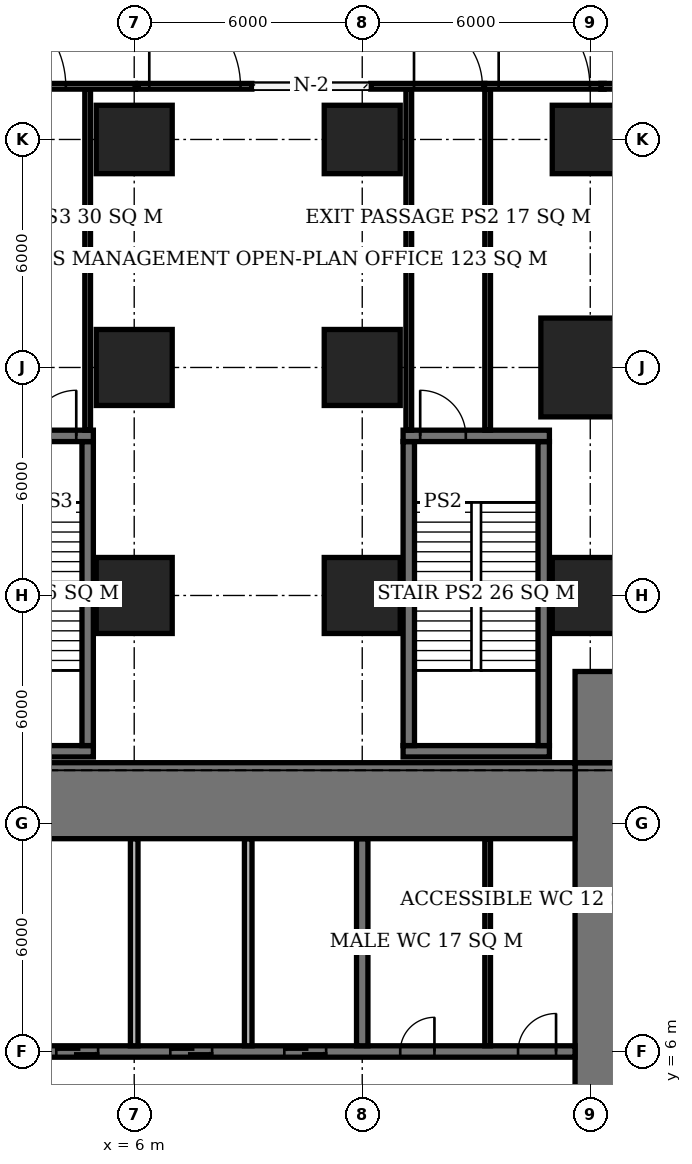
"""IFC4 building model, lengths in metres.
Left out: names, types, materials, properties, quantities, classifications, styles, units other than length and angle.
Written with IfcOpenShell. Run it as: python <this file> out.ifc"""

import sys

from ifc_helpers import new_model, si_unit, direction, frame, frame_2d, origin, origin_2d, place, context, subcontext, project, spatial, rectangle, extrude, element, fill, save


model = new_model("IFC4")
c1 = context("Model", 3, precision=1e-05, world=origin(), true_north=direction((0.0, 1.0)))
c2 = subcontext(c1, "Body", "Model", "MODEL_VIEW")
j1 = project(units=[si_unit("LENGTHUNIT", "METRE"), si_unit("PLANEANGLEUNIT", "RADIAN")], contexts=[c1])
p1 = place(None, origin())
s1 = spatial("IfcSite", under=j1, at=p1, CompositionType="ELEMENT")
p2 = place(p1, origin())
s2 = spatial("IfcBuilding", under=s1, at=p2, CompositionType="ELEMENT")
p3 = place(p2, origin())
s3 = spatial("IfcBuildingStorey", under=s2, at=p3, CompositionType="ELEMENT", Elevation=0.0)
p4 = place(p3, frame((6.0, 18.0, 0.0), z_axis=(0.0, 0.0, 1.0), x_axis=(1.0, 0.0, 0.0)))
e1 = element("IfcColumn", 1, at=p4, inside=s3, PredefinedType="COLUMN", context=c2, shape_type="SweptSolid", body=[
    extrude(rectangle(XDim=2.0, YDim=2.0, at=origin_2d()), origin(), (0.0, 0.0, 1.0), 6.0),
])
p5 = place(p3, frame((6.0, 24.0, -0.45), z_axis=(0.0, 0.0, 1.0), x_axis=(1.0, 0.0, 0.0)))
e2 = element("IfcColumn", 2, at=p5, inside=s3, PredefinedType="COLUMN", context=c2, shape_type="SweptSolid", body=[
    extrude(rectangle(XDim=2.0, YDim=2.0, at=origin_2d()), origin(), (0.0, 0.0, 1.0), 6.45),
])
p6 = place(p3, frame((6.0, 30.0, -0.45), z_axis=(0.0, 0.0, 1.0), x_axis=(1.0, 0.0, 0.0)))
e3 = element("IfcColumn", 3, at=p6, inside=s3, PredefinedType="COLUMN", context=c2, shape_type="SweptSolid", body=[
    extrude(rectangle(XDim=2.0, YDim=1.8, at=origin_2d()), origin(), (0.0, 0.0, 1.0), 6.45),
])
p7 = place(p3, frame((12.0, 18.0, 0.0), z_axis=(0.0, 0.0, 1.0), x_axis=(1.0, 0.0, 0.0)))
e4 = element("IfcColumn", 4, at=p7, inside=s3, PredefinedType="COLUMN", context=c2, shape_type="SweptSolid", body=[
    extrude(rectangle(XDim=2.0, YDim=2.0, at=origin_2d()), origin(), (0.0, 0.0, 1.0), 6.0),
])
p8 = place(p3, frame((12.0, 24.0, -0.45), z_axis=(0.0, 0.0, 1.0), x_axis=(1.0, 0.0, 0.0)))
e5 = element("IfcColumn", 5, at=p8, inside=s3, PredefinedType="COLUMN", context=c2, shape_type="SweptSolid", body=[
    extrude(rectangle(XDim=2.0, YDim=2.0, at=origin_2d()), origin(), (0.0, 0.0, 1.0), 6.45),
])
p9 = place(p3, frame((12.0, 30.0, -0.45), z_axis=(0.0, 0.0, 1.0), x_axis=(1.0, 0.0, 0.0)))
e6 = element("IfcColumn", 6, at=p9, inside=s3, PredefinedType="COLUMN", context=c2, shape_type="SweptSolid", body=[
    extrude(rectangle(XDim=2.0, YDim=1.8, at=origin_2d()), origin(), (0.0, 0.0, 1.0), 6.45),
])
p10 = place(p3, frame((18.0, 18.0, 0.0), z_axis=(0.0, 0.0, 1.0), x_axis=(1.0, 0.0, 0.0)))
e7 = element("IfcColumn", 7, at=p10, inside=s3, PredefinedType="COLUMN", context=c2, shape_type="SweptSolid", body=[
    extrude(rectangle(XDim=2.0, YDim=2.0, at=origin_2d()), origin(), (0.0, 0.0, 1.0), 6.0),
])
p11 = place(p3, frame((18.0, 24.0, -0.45), z_axis=(0.0, 0.0, 1.0), x_axis=(1.0, 0.0, 0.0)))
e8 = element("IfcColumn", 8, at=p11, inside=s3, PredefinedType="COLUMN", context=c2, shape_type="SweptSolid", body=[
    extrude(rectangle(XDim=2.6, YDim=2.6, at=origin_2d()), origin(), (0.0, 0.0, 1.0), 6.45),
])
p12 = place(p3, frame((18.0, 30.0, -0.45), z_axis=(0.0, 0.0, 1.0), x_axis=(1.0, 0.0, 0.0)))
e9 = element("IfcColumn", 9, at=p12, inside=s3, PredefinedType="COLUMN", context=c2, shape_type="SweptSolid", body=[
    extrude(rectangle(XDim=2.0, YDim=1.8, at=origin_2d()), origin(), (0.0, 0.0, 1.0), 6.45),
])
p13 = place(p3, frame((-5.6, 12.6, 0.0), z_axis=(0.0, 0.0, 1.0), x_axis=(1.0, 0.0, 0.0)))
e10 = element("IfcWall", 10, at=p13, inside=s3, PredefinedType="SHEAR", context=c2, shape_type="SweptSolid", body=[
    extrude(rectangle(XDim=23.2, YDim=2.0, at=frame_2d((11.6, 0.0))), origin(), (0.0, 0.0, 1.0), 6.0),
])
p14 = place(p3, frame((18.5, -7.6, 0.0), z_axis=(0.0, 0.0, 1.0), x_axis=(0.0, 1.0, 0.0)))
e11 = element("IfcWall", 11, at=p14, inside=s3, PredefinedType="SHEAR", context=c2, shape_type="SweptSolid", body=[
    extrude(rectangle(XDim=21.2, YDim=1.8, at=frame_2d((10.6, 0.0))), origin(), (0.0, 0.0, 1.0), 6.0),
])
p15 = place(p14, frame((9.2, 0.0, 0.0)))
e12 = element("IfcOpeningElement", 12, at=p15, cuts=e11, PredefinedType="OPENING", context=c2, shape_type="SweptSolid", body=[
    extrude(rectangle(XDim=1.8, YDim=2.4, at=frame_2d((0.9, 1.2))), frame((0.0, 0.91, 0.0), z_axis=(0.0, -1.0, 0.0), x_axis=(1.0, 0.0, 0.0)), (0.0, 0.0, 1.0), 1.82),
])
p16 = place(p3, frame((18.5, 13.6, 0.0), z_axis=(0.0, 0.0, 1.0), x_axis=(0.0, 1.0, 0.0)))
e13 = element("IfcWall", 13, at=p16, inside=s3, PredefinedType="SHEAR", context=c2, shape_type="SweptSolid", body=[
    extrude(rectangle(XDim=2.4, YDim=1.8, at=frame_2d((1.2, 0.0))), origin(), (0.0, 0.0, 1.0), 6.0),
])
p17 = place(p3, frame((-0.15, 6.0, 0.0), z_axis=(0.0, 0.0, 1.0), x_axis=(1.0, 0.0, 0.0)))
e14 = element("IfcWall", 14, at=p17, inside=s3, PredefinedType="SHEAR", context=c2, shape_type="SweptSolid", body=[
    extrude(rectangle(XDim=17.75, YDim=0.3, at=frame_2d((8.875, 0.0))), origin(), (0.0, 0.0, 1.0), 6.0),
])
p18 = place(p17, frame((13.15, 0.0, 0.0)))
e15 = element("IfcOpeningElement", 15, at=p18, cuts=e14, PredefinedType="OPENING", context=c2, shape_type="SweptSolid", body=[
    extrude(rectangle(XDim=0.9, YDim=2.1, at=frame_2d((0.45, 1.05))), frame((0.0, 0.16, 0.0), z_axis=(0.0, -1.0, 0.0), x_axis=(1.0, 0.0, 0.0)), (0.0, 0.0, 1.0), 0.32),
])
p19 = place(p17, frame((16.25, 0.0, 0.0)))
e16 = element("IfcOpeningElement", 16, at=p19, cuts=e14, PredefinedType="OPENING", context=c2, shape_type="SweptSolid", body=[
    extrude(rectangle(XDim=1.0, YDim=2.1, at=frame_2d((0.5, 1.05))), frame((0.0, 0.16, 0.0), z_axis=(0.0, -1.0, 0.0), x_axis=(1.0, 0.0, 0.0)), (0.0, 0.0, 1.0), 0.32),
])
p20 = place(p17, frame((1.1, 0.0, 0.0)))
e17 = element("IfcOpeningElement", 17, at=p20, cuts=e14, PredefinedType="OPENING", context=c2, shape_type="SweptSolid", body=[
    extrude(rectangle(XDim=1.1, YDim=2.1, at=frame_2d((0.55, 1.05))), frame((0.0, 0.16, 0.0), z_axis=(0.0, -1.0, 0.0), x_axis=(1.0, 0.0, 0.0)), (0.0, 0.0, 1.0), 0.32),
])
p21 = place(p17, frame((4.1, 0.0, 0.0)))
e18 = element("IfcOpeningElement", 18, at=p21, cuts=e14, PredefinedType="OPENING", context=c2, shape_type="SweptSolid", body=[
    extrude(rectangle(XDim=1.1, YDim=2.1, at=frame_2d((0.55, 1.05))), frame((0.0, 0.16, 0.0), z_axis=(0.0, -1.0, 0.0), x_axis=(1.0, 0.0, 0.0)), (0.0, 0.0, 1.0), 0.32),
])
p22 = place(p17, frame((7.1, 0.0, 0.0)))
e19 = element("IfcOpeningElement", 19, at=p22, cuts=e14, PredefinedType="OPENING", context=c2, shape_type="SweptSolid", body=[
    extrude(rectangle(XDim=1.1, YDim=2.1, at=frame_2d((0.55, 1.05))), frame((0.0, 0.16, 0.0), z_axis=(0.0, -1.0, 0.0), x_axis=(1.0, 0.0, 0.0)), (0.0, 0.0, 1.0), 0.32),
])
p23 = place(p17, frame((10.1, 0.0, 0.0)))
e20 = element("IfcOpeningElement", 20, at=p23, cuts=e14, PredefinedType="OPENING", context=c2, shape_type="SweptSolid", body=[
    extrude(rectangle(XDim=1.1, YDim=2.1, at=frame_2d((0.55, 1.05))), frame((0.0, 0.16, 0.0), z_axis=(0.0, -1.0, 0.0), x_axis=(1.0, 0.0, 0.0)), (0.0, 0.0, 1.0), 0.32),
])
p24 = place(p3, frame((12.0, 6.15, 0.0), z_axis=(0.0, 0.0, 1.0), x_axis=(0.0, 1.0, 0.0)))
e21 = element("IfcWall", 21, at=p24, inside=s3, PredefinedType="SHEAR", context=c2, shape_type="SweptSolid", body=[
    extrude(rectangle(XDim=5.45, YDim=0.3, at=frame_2d((2.725, 0.0))), origin(), (0.0, 0.0, 1.0), 6.0),
])
for number, where, z_axis, x_axis in (
    (22, (6.0, 6.15, 0.0), (0.0, 0.0, 1.0), (0.0, 1.0, 0.0)),
    (23, (9.0, 6.15, 0.0), (0.0, 0.0, 1.0), (0.0, 1.0, 0.0)),
):
    element("IfcWall", number, at=place(p3, frame(where, z_axis=z_axis, x_axis=x_axis)), inside=s3, PredefinedType="SOLIDWALL", context=c2, shape_type="SweptSolid", body=[
        extrude(rectangle(XDim=5.45, YDim=0.2, at=frame_2d((2.725, 0.0))), origin(), (0.0, 0.0, 1.0), 6.0),
    ])
p25 = place(p3, frame((18.28, 31.4, 0.0), z_axis=(0.0, 0.0, 1.0), x_axis=(1.0, 0.0, 0.0)))
e24 = element("IfcWall", 24, at=p25, inside=s3, PredefinedType="USERDEFINED", context=c2, shape_type="SweptSolid", body=[
    extrude(rectangle(XDim=3.074, YDim=0.15, at=frame_2d((1.537, 0.0))), origin(), (0.0, 0.0, 1.0), 6.0),
])
p26 = place(p25, frame((0.375, 0.0, 0.0)))
e25 = element("IfcOpeningElement", 25, at=p26, cuts=e24, PredefinedType="OPENING", context=c2, shape_type="SweptSolid", body=[
    extrude(rectangle(XDim=2.4, YDim=2.7, at=frame_2d((1.2, 1.35))), frame((0.0, 0.085, 0.0), z_axis=(0.0, -1.0, 0.0), x_axis=(1.0, 0.0, 0.0)), (0.0, 0.0, 1.0), 0.17),
])
p27 = place(p3, frame((15.215, 31.4, 0.0), z_axis=(0.0, 0.0, 1.0), x_axis=(1.0, 0.0, 0.0)))
e26 = element("IfcWall", 26, at=p27, inside=s3, PredefinedType="USERDEFINED", context=c2, shape_type="SweptSolid", body=[
    extrude(rectangle(XDim=3.15, YDim=0.15, at=frame_2d((1.575, 0.0))), origin(), (0.0, 0.0, 1.0), 6.0),
])
p28 = place(p27, frame((0.375, 0.0, 0.0)))
e27 = element("IfcOpeningElement", 27, at=p28, cuts=e26, PredefinedType="OPENING", context=c2, shape_type="SweptSolid", body=[
    extrude(rectangle(XDim=2.4, YDim=2.7, at=frame_2d((1.2, 1.35))), frame((0.0, 0.085, 0.0), z_axis=(0.0, -1.0, 0.0), x_axis=(1.0, 0.0, 0.0)), (0.0, 0.0, 1.0), 0.17),
])
p29 = place(p3, frame((-0.032, 31.4, 0.0), z_axis=(0.0, 0.0, 1.0), x_axis=(1.0, 0.0, 0.0)))
e28 = element("IfcWall", 28, at=p29, inside=s3, PredefinedType="USERDEFINED", context=c2, shape_type="SweptSolid", body=[
    extrude(rectangle(XDim=6.064, YDim=0.15, at=frame_2d((3.032, 0.0))), origin(), (0.0, 0.0, 1.0), 6.0),
])
p30 = place(p29, frame((1.832, 0.0, 0.0)))
e29 = element("IfcOpeningElement", 29, at=p30, cuts=e28, PredefinedType="OPENING", context=c2, shape_type="SweptSolid", body=[
    extrude(rectangle(XDim=2.4, YDim=2.7, at=frame_2d((1.2, 1.35))), frame((0.0, 0.085, 0.0), z_axis=(0.0, -1.0, 0.0), x_axis=(1.0, 0.0, 0.0)), (0.0, 0.0, 1.0), 0.17),
])
p31 = place(p3, frame((12.226, 31.4, 0.0), z_axis=(0.0, 0.0, 1.0), x_axis=(1.0, 0.0, 0.0)))
e30 = element("IfcWall", 30, at=p31, inside=s3, PredefinedType="USERDEFINED", context=c2, shape_type="SweptSolid", body=[
    extrude(rectangle(XDim=2.999, YDim=0.15, at=frame_2d((1.5, 0.0))), origin(), (0.0, 0.0, 1.0), 6.0),
])
p32 = place(p31, frame((1.137, 0.0, 0.0)))
e31 = element("IfcOpeningElement", 31, at=p32, cuts=e30, PredefinedType="OPENING", context=c2, shape_type="SweptSolid", body=[
    extrude(rectangle(XDim=1.8, YDim=2.4, at=frame_2d((0.9, 1.2))), frame((0.0, 0.085, 0.0), z_axis=(0.0, -1.0, 0.0), x_axis=(1.0, 0.0, 0.0)), (0.0, 0.0, 1.0), 0.17),
])
p33 = place(p3, frame((6.097, 31.4, 0.0), z_axis=(0.0, 0.0, 1.0), x_axis=(1.0, 0.0, 0.0)))
e32 = element("IfcWall", 32, at=p33, inside=s3, PredefinedType="USERDEFINED", context=c2, shape_type="SweptSolid", body=[
    extrude(rectangle(XDim=3.0, YDim=0.15, at=frame_2d((1.5, 0.0))), origin(), (0.0, 0.0, 1.0), 6.0),
])
p34 = place(p33, frame((0.3, 0.0, 0.0)))
e33 = element("IfcOpeningElement", 33, at=p34, cuts=e32, PredefinedType="OPENING", context=c2, shape_type="SweptSolid", body=[
    extrude(rectangle(XDim=2.4, YDim=2.7, at=frame_2d((1.2, 1.35))), frame((0.0, 0.085, 0.0), z_axis=(0.0, -1.0, 0.0), x_axis=(1.0, 0.0, 0.0)), (0.0, 0.0, 1.0), 0.17),
])
p35 = place(p3, frame((15.3, 6.15, 0.0), z_axis=(0.0, 0.0, 1.0), x_axis=(0.0, 1.0, 0.0)))
e34 = element("IfcWall", 34, at=p35, inside=s3, PredefinedType="PLUMBINGWALL", context=c2, shape_type="SweptSolid", body=[
    extrude(rectangle(XDim=5.45, YDim=0.15, at=frame_2d((2.725, 0.0))), origin(), (0.0, 0.0, 1.0), 5.75),
])
p36 = place(p3, frame((13.075, 13.9, 0.0), z_axis=(0.0, 0.0, 1.0), x_axis=(1.0, 0.0, 0.0)))
e35 = element("IfcWall", 35, at=p36, inside=s3, PredefinedType="SOLIDWALL", context=c2, shape_type="SweptSolid", body=[
    extrude(rectangle(XDim=3.85, YDim=0.3, at=frame_2d((1.925, 0.0))), origin(), (0.0, 0.0, 1.0), 5.75),
])
p37 = place(p3, frame((13.075, 22.2, 0.0), z_axis=(0.0, 0.0, 1.0), x_axis=(1.0, 0.0, 0.0)))
e36 = element("IfcWall", 36, at=p37, inside=s3, PredefinedType="SOLIDWALL", context=c2, shape_type="SweptSolid", body=[
    extrude(rectangle(XDim=3.85, YDim=0.3, at=frame_2d((1.925, 0.0))), origin(), (0.0, 0.0, 1.0), 5.75),
])
p38 = place(p37, frame((0.45, 0.0, 0.0)))
e37 = element("IfcOpeningElement", 37, at=p38, cuts=e36, PredefinedType="OPENING", context=c2, shape_type="SweptSolid", body=[
    extrude(rectangle(XDim=1.2, YDim=2.1, at=frame_2d((0.6, 1.05))), frame((0.0, 0.16, 0.0), z_axis=(0.0, -1.0, 0.0), x_axis=(1.0, 0.0, 0.0)), (0.0, 0.0, 1.0), 0.32),
])
for number, where, z_axis, x_axis in (
    (38, (13.225, 14.05, 0.0), (0.0, 0.0, 1.0), (0.0, 1.0, 0.0)),
    (39, (16.775, 14.05, 0.0), (0.0, 0.0, 1.0), (0.0, 1.0, 0.0)),
):
    element("IfcWall", number, at=place(p3, frame(where, z_axis=z_axis, x_axis=x_axis)), inside=s3, PredefinedType="SOLIDWALL", context=c2, shape_type="SweptSolid", body=[
        extrude(rectangle(XDim=8.0, YDim=0.3, at=frame_2d((4.0, 0.0))), origin(), (0.0, 0.0, 1.0), 5.75),
    ])
p39 = place(p3, frame((1.075, 13.9, 0.0), z_axis=(0.0, 0.0, 1.0), x_axis=(1.0, 0.0, 0.0)))
e40 = element("IfcWall", 40, at=p39, inside=s3, PredefinedType="SOLIDWALL", context=c2, shape_type="SweptSolid", body=[
    extrude(rectangle(XDim=3.85, YDim=0.3, at=frame_2d((1.925, 0.0))), origin(), (0.0, 0.0, 1.0), 5.75),
])
p40 = place(p3, frame((1.075, 22.2, 0.0), z_axis=(0.0, 0.0, 1.0), x_axis=(1.0, 0.0, 0.0)))
e41 = element("IfcWall", 41, at=p40, inside=s3, PredefinedType="SOLIDWALL", context=c2, shape_type="SweptSolid", body=[
    extrude(rectangle(XDim=3.85, YDim=0.3, at=frame_2d((1.925, 0.0))), origin(), (0.0, 0.0, 1.0), 5.75),
])
p41 = place(p40, frame((2.2, 0.0, 0.0)))
e42 = element("IfcOpeningElement", 42, at=p41, cuts=e41, PredefinedType="OPENING", context=c2, shape_type="SweptSolid", body=[
    extrude(rectangle(XDim=1.2, YDim=2.1, at=frame_2d((0.6, 1.05))), frame((0.0, 0.16, 0.0), z_axis=(0.0, -1.0, 0.0), x_axis=(1.0, 0.0, 0.0)), (0.0, 0.0, 1.0), 0.32),
])
p42 = place(p3, frame((4.775, 14.05, 0.0), z_axis=(0.0, 0.0, 1.0), x_axis=(0.0, 1.0, 0.0)))
e43 = element("IfcWall", 43, at=p42, inside=s3, PredefinedType="SOLIDWALL", context=c2, shape_type="SweptSolid", body=[
    extrude(rectangle(XDim=8.0, YDim=0.3, at=frame_2d((4.0, 0.0))), origin(), (0.0, 0.0, 1.0), 5.75),
])
for number, where, z_axis, x_axis in (
    (44, (4.775, 22.35, 0.0), (0.0, 0.0, 1.0), (0.0, 1.0, 0.0)),
    (45, (13.225, 22.35, 0.0), (0.0, 0.0, 1.0), (0.0, 1.0, 0.0)),
    (46, (15.3, 22.35, 0.0), (0.0, 0.0, 1.0), (0.0, 1.0, 0.0)),
):
    element("IfcWall", number, at=place(p3, frame(where, z_axis=z_axis, x_axis=x_axis)), inside=s3, PredefinedType="PARTITIONING", context=c2, shape_type="SweptSolid", body=[
        extrude(rectangle(XDim=8.975, YDim=0.15, at=frame_2d((4.487, 0.0))), origin(), (0.0, 0.0, 1.0), 5.75),
    ])
p43 = place(p28, origin())
e47 = element("IfcDoor", 47, at=p43, inside=s3, OperationType="DOUBLE_DOOR_SINGLE_SWING", PredefinedType="DOOR", context=c2, shape_type="SweptSolid", body=[
    extrude(rectangle(XDim=2.4, YDim=2.7, at=frame_2d((1.2, 1.35))), frame((0.0, 0.025, 0.0), z_axis=(0.0, -1.0, 0.0), x_axis=(1.0, 0.0, 0.0)), (0.0, 0.0, 1.0), 0.05),
])
fill(e27, e47)
p44 = place(p18, origin())
e48 = element("IfcDoor", 48, at=p44, inside=s3, OperationType="SINGLE_SWING_RIGHT", PredefinedType="DOOR", context=c2, shape_type="SweptSolid", body=[
    extrude(rectangle(XDim=0.9, YDim=2.1, at=frame_2d((0.45, 1.05))), frame((0.0, 0.025, 0.0), z_axis=(0.0, -1.0, 0.0), x_axis=(1.0, 0.0, 0.0)), (0.0, 0.0, 1.0), 0.05),
])
fill(e15, e48)
p45 = place(p19, origin())
e49 = element("IfcDoor", 49, at=p45, inside=s3, OperationType="SINGLE_SWING_RIGHT", PredefinedType="DOOR", context=c2, shape_type="SweptSolid", body=[
    extrude(rectangle(XDim=1.0, YDim=2.1, at=frame_2d((0.5, 1.05))), frame((0.0, 0.025, 0.0), z_axis=(0.0, -1.0, 0.0), x_axis=(1.0, 0.0, 0.0)), (0.0, 0.0, 1.0), 0.05),
])
fill(e16, e49)
p46 = place(p21, origin())
e50 = element("IfcDoor", 50, at=p46, inside=s3, OperationType="DOUBLE_DOOR_SLIDING", PredefinedType="USERDEFINED", context=c2, shape_type="SweptSolid", body=[
    extrude(rectangle(XDim=1.1, YDim=2.1, at=frame_2d((0.55, 1.05))), frame((0.0, 0.025, 0.0), z_axis=(0.0, -1.0, 0.0), x_axis=(1.0, 0.0, 0.0)), (0.0, 0.0, 1.0), 0.05),
])
fill(e18, e50)
p47 = place(p22, origin())
e51 = element("IfcDoor", 51, at=p47, inside=s3, OperationType="DOUBLE_DOOR_SLIDING", PredefinedType="USERDEFINED", context=c2, shape_type="SweptSolid", body=[
    extrude(rectangle(XDim=1.1, YDim=2.1, at=frame_2d((0.55, 1.05))), frame((0.0, 0.025, 0.0), z_axis=(0.0, -1.0, 0.0), x_axis=(1.0, 0.0, 0.0)), (0.0, 0.0, 1.0), 0.05),
])
fill(e19, e51)
p48 = place(p23, origin())
e52 = element("IfcDoor", 52, at=p48, inside=s3, OperationType="DOUBLE_DOOR_SLIDING", PredefinedType="USERDEFINED", context=c2, shape_type="SweptSolid", body=[
    extrude(rectangle(XDim=1.1, YDim=2.1, at=frame_2d((0.55, 1.05))), frame((0.0, 0.025, 0.0), z_axis=(0.0, -1.0, 0.0), x_axis=(1.0, 0.0, 0.0)), (0.0, 0.0, 1.0), 0.05),
])
fill(e20, e52)
p49 = place(p38, origin())
e53 = element("IfcDoor", 53, at=p49, inside=s3, OperationType="SINGLE_SWING_LEFT", PredefinedType="DOOR", context=c2, shape_type="SweptSolid", body=[
    extrude(rectangle(XDim=1.2, YDim=2.1, at=frame_2d((0.6, 1.05))), frame((0.0, 0.025, 0.0), z_axis=(0.0, -1.0, 0.0), x_axis=(1.0, 0.0, 0.0)), (0.0, 0.0, 1.0), 0.05),
])
fill(e37, e53)
p50 = place(p41, origin())
e54 = element("IfcDoor", 54, at=p50, inside=s3, OperationType="SINGLE_SWING_RIGHT", PredefinedType="DOOR", context=c2, shape_type="SweptSolid", body=[
    extrude(rectangle(XDim=1.2, YDim=2.1, at=frame_2d((0.6, 1.05))), frame((0.0, 0.025, 0.0), z_axis=(0.0, -1.0, 0.0), x_axis=(1.0, 0.0, 0.0)), (0.0, 0.0, 1.0), 0.05),
])
fill(e42, e54)
p51 = place(p30, origin())
e55 = element("IfcDoor", 55, at=p51, inside=s3, OperationType="DOUBLE_DOOR_SINGLE_SWING", PredefinedType="DOOR", context=c2, shape_type="SweptSolid", body=[
    extrude(rectangle(XDim=2.4, YDim=2.7, at=frame_2d((1.2, 1.35))), frame((0.0, 0.025, 0.0), z_axis=(0.0, -1.0, 0.0), x_axis=(1.0, 0.0, 0.0)), (0.0, 0.0, 1.0), 0.05),
])
fill(e29, e55)
p52 = place(p32, origin())
e56 = element("IfcDoor", 56, at=p52, inside=s3, OperationType="DOUBLE_DOOR_SINGLE_SWING", PredefinedType="DOOR", context=c2, shape_type="SweptSolid", body=[
    extrude(rectangle(XDim=1.8, YDim=2.4, at=frame_2d((0.9, 1.2))), frame((0.0, 0.025, 0.0), z_axis=(0.0, -1.0, 0.0), x_axis=(1.0, 0.0, 0.0)), (0.0, 0.0, 1.0), 0.05),
])
fill(e31, e56)
p53 = place(p34, origin())
e57 = element("IfcDoor", 57, at=p53, inside=s3, OperationType="DOUBLE_DOOR_SINGLE_SWING", PredefinedType="DOOR", context=c2, shape_type="SweptSolid", body=[
    extrude(rectangle(XDim=2.4, YDim=2.7, at=frame_2d((1.2, 1.35))), frame((0.0, 0.025, 0.0), z_axis=(0.0, -1.0, 0.0), x_axis=(1.0, 0.0, 0.0)), (0.0, 0.0, 1.0), 0.05),
])
fill(e33, e57)
save(model, sys.argv[1])
